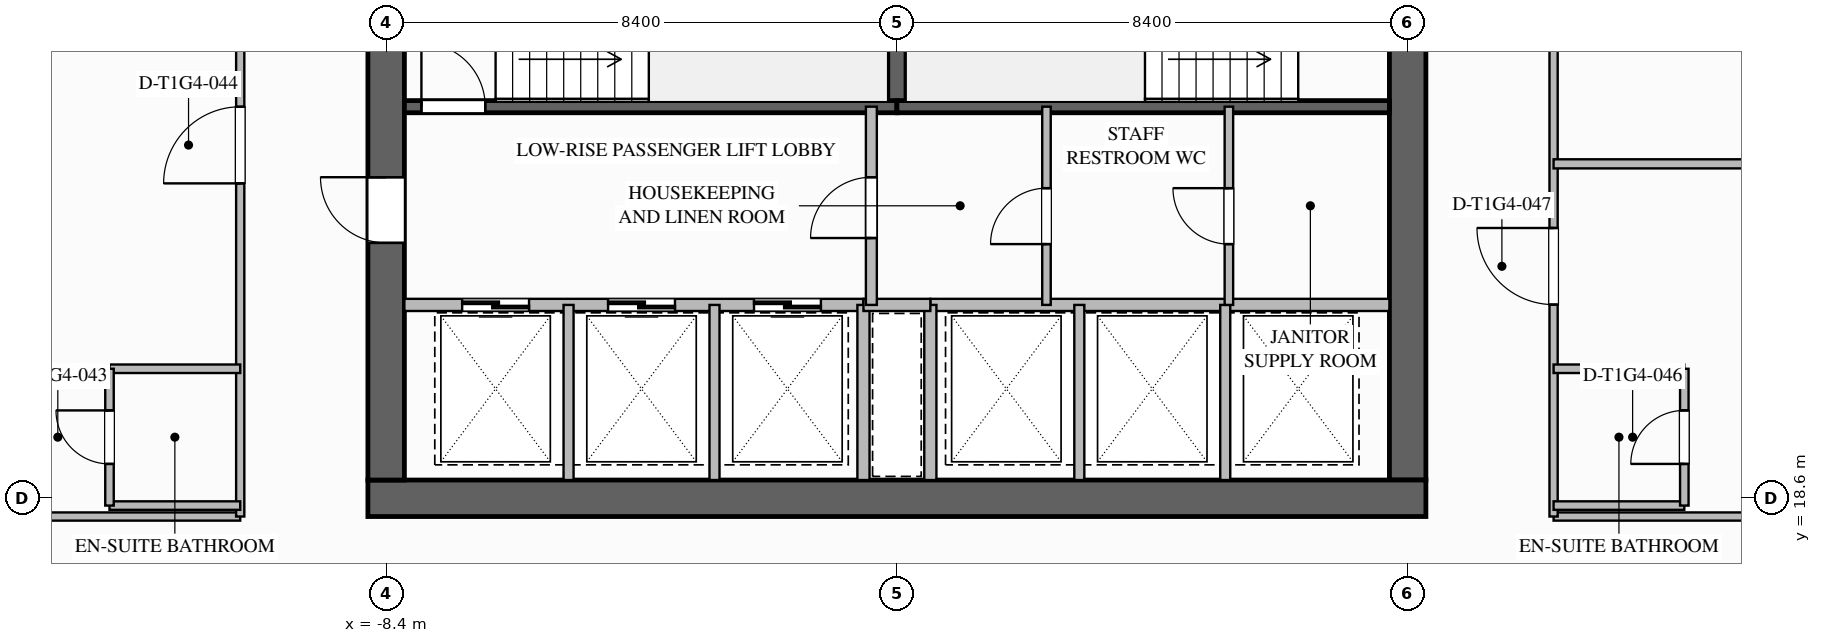
"""IFC4 building model, lengths in metres.
Left out: names, types, materials, properties, quantities, classifications, styles, units other than length and angle.
Written with IfcOpenShell. Run it as: python <this file> out.ifc"""

import sys

from ifc_helpers import new_model, si_unit, direction, frame, frame_2d, origin, place, context, subcontext, project, spatial, rectangle, extrude, element, fill, save


model = new_model("IFC4")
c1 = context("Model", 3, precision=1e-05, world=origin(), true_north=direction((0.0, 1.0)))
c2 = subcontext(c1, "Body", "Model", "MODEL_VIEW")
j1 = project(units=[si_unit("LENGTHUNIT", "METRE"), si_unit("PLANEANGLEUNIT", "RADIAN")], contexts=[c1])
p1 = place(None, origin())
s1 = spatial("IfcSite", under=j1, at=p1, CompositionType="ELEMENT")
p2 = place(p1, origin())
s2 = spatial("IfcBuilding", under=s1, at=p2, CompositionType="ELEMENT")
p3 = place(p2, frame((0.0, 0.0, 64.7)))
s3 = spatial("IfcBuildingStorey", under=s2, at=p3, CompositionType="ELEMENT", Elevation=64.7)
p4 = place(p3, frame((8.4, 35.1, 0.0), z_axis=(0.0, 0.0, 1.0), x_axis=(0.0, -1.0, 0.0)))
e1 = element("IfcWall", 1, at=p4, inside=s3, PredefinedType="SHEAR", context=c2, shape_type="SweptSolid", body=[
    extrude(rectangle(XDim=16.2, YDim=0.6, at=frame_2d((8.1, 0.0))), origin(), (0.0, 0.0, 1.0), 3.5),
])
p5 = place(p4, frame((3.08, 0.0, 0.0)))
e2 = element("IfcOpeningElement", 2, at=p5, cuts=e1, PredefinedType="OPENING", context=c2, shape_type="SweptSolid", body=[
    extrude(rectangle(XDim=1.12, YDim=2.1, at=frame_2d((0.56, 1.05))), frame((0.0, 0.31, 0.0), z_axis=(0.0, -1.0, 0.0), x_axis=(1.0, 0.0, 0.0)), (0.0, 0.0, 1.0), 0.62),
])
p6 = place(p3, frame((8.7, 18.6, 0.0), z_axis=(0.0, 0.0, 1.0), x_axis=(-1.0, 0.0, 0.0)))
e3 = element("IfcWall", 3, at=p6, inside=s3, PredefinedType="SHEAR", context=c2, shape_type="SweptSolid", body=[
    extrude(rectangle(XDim=17.4, YDim=0.6, at=frame_2d((8.7, 0.0))), origin(), (0.0, 0.0, 1.0), 3.5),
])
p7 = place(p3, frame((-8.4, 18.9, 0.0), z_axis=(0.0, 0.0, 1.0), x_axis=(0.0, 1.0, 0.0)))
e4 = element("IfcWall", 4, at=p7, inside=s3, PredefinedType="SHEAR", context=c2, shape_type="SweptSolid", body=[
    extrude(rectangle(XDim=16.2, YDim=0.6, at=frame_2d((8.1, 0.0))), origin(), (0.0, 0.0, 1.0), 3.5),
])
p8 = place(p7, frame((3.9, 0.0, 0.0)))
e5 = element("IfcOpeningElement", 5, at=p8, cuts=e4, PredefinedType="OPENING", context=c2, shape_type="SweptSolid", body=[
    extrude(rectangle(XDim=1.08, YDim=2.04, at=frame_2d((0.54, 1.02))), frame((0.0, 0.31, 0.0), z_axis=(0.0, -1.0, 0.0), x_axis=(1.0, 0.0, 0.0)), (0.0, 0.0, 1.0), 0.62),
])
p9 = place(p3, frame((0.0, 25.04, 0.0), z_axis=(0.0, 0.0, 1.0), x_axis=(0.0, 1.0, 0.0)))
e6 = element("IfcWall", 6, at=p9, inside=s3, PredefinedType="SOLIDWALL", context=c2, shape_type="SweptSolid", body=[
    extrude(rectangle(XDim=3.12, YDim=0.3, at=frame_2d((1.56, 0.0))), origin(), (0.0, 0.0, 1.0), 3.24),
])
p10 = place(p3, frame((-8.1, 25.04, 0.0), z_axis=(0.0, 0.0, 1.0), x_axis=(1.0, 0.0, 0.0)))
e7 = element("IfcWall", 7, at=p10, inside=s3, PredefinedType="SOLIDWALL", context=c2, shape_type="SweptSolid", body=[
    extrude(rectangle(XDim=8.1, YDim=0.2, at=frame_2d((4.05, 0.0))), origin(), (0.0, 0.0, 1.0), 3.24),
])
p11 = place(p10, frame((0.28, 0.0, 0.0)))
e8 = element("IfcOpeningElement", 8, at=p11, cuts=e7, PredefinedType="OPENING", context=c2, shape_type="SweptSolid", body=[
    extrude(rectangle(XDim=1.05, YDim=2.1, at=frame_2d((0.525, 1.05))), frame((0.0, 0.11, 0.0), z_axis=(0.0, -1.0, 0.0), x_axis=(1.0, 0.0, 0.0)), (0.0, 0.0, 1.0), 0.22),
])
p12 = place(p3, frame((0.0, 25.04, 0.0), z_axis=(0.0, 0.0, 1.0), x_axis=(1.0, 0.0, 0.0)))
e9 = element("IfcWall", 9, at=p12, inside=s3, PredefinedType="SOLIDWALL", context=c2, shape_type="SweptSolid", body=[
    extrude(rectangle(XDim=8.1, YDim=0.2, at=frame_2d((4.05, 0.0))), origin(), (0.0, 0.0, 1.0), 3.24),
])
p13 = place(p3, frame((-0.55, 21.78, 0.0), z_axis=(0.0, 0.0, 1.0), x_axis=(-1.0, 0.0, 0.0)))
e10 = element("IfcWall", 10, at=p13, inside=s3, PredefinedType="SOLIDWALL", context=c2, shape_type="SweptSolid", body=[
    extrude(rectangle(XDim=7.55, YDim=0.2, at=frame_2d((3.775, 0.0))), origin(), (0.0, 0.0, 1.0), 3.24),
])
p14 = place(p13, frame((5.5, 0.0, 0.0)))
e11 = element("IfcOpeningElement", 11, at=p14, cuts=e10, PredefinedType="OPENING", context=c2, shape_type="SweptSolid", body=[
    extrude(rectangle(XDim=1.1, YDim=2.2, at=frame_2d((0.55, 1.1))), frame((0.0, 0.11, 0.0), z_axis=(0.0, -1.0, 0.0), x_axis=(1.0, 0.0, 0.0)), (0.0, 0.0, 1.0), 0.22),
])
p15 = place(p13, frame((3.1, 0.0, 0.0)))
e12 = element("IfcOpeningElement", 12, at=p15, cuts=e10, PredefinedType="OPENING", context=c2, shape_type="SweptSolid", body=[
    extrude(rectangle(XDim=1.1, YDim=2.2, at=frame_2d((0.55, 1.1))), frame((0.0, 0.11, 0.0), z_axis=(0.0, -1.0, 0.0), x_axis=(1.0, 0.0, 0.0)), (0.0, 0.0, 1.0), 0.22),
])
p16 = place(p13, frame((0.7, 0.0, 0.0)))
e13 = element("IfcOpeningElement", 13, at=p16, cuts=e10, PredefinedType="OPENING", context=c2, shape_type="SweptSolid", body=[
    extrude(rectangle(XDim=1.1, YDim=2.2, at=frame_2d((0.55, 1.1))), frame((0.0, 0.11, 0.0), z_axis=(0.0, -1.0, 0.0), x_axis=(1.0, 0.0, 0.0)), (0.0, 0.0, 1.0), 0.22),
])
for number, where, z_axis, x_axis in (
    (14, (-5.4, 18.9, 0.0), (0.0, 0.0, 1.0), (0.0, 1.0, 0.0)),
    (15, (-3.0, 18.9, 0.0), (0.0, 0.0, 1.0), (0.0, 1.0, 0.0)),
):
    element("IfcWall", number, at=place(p3, frame(where, z_axis=z_axis, x_axis=x_axis)), inside=s3, PredefinedType="PARTITIONING", context=c2, shape_type="SweptSolid", body=[
        extrude(rectangle(XDim=2.88, YDim=0.165, at=frame_2d((1.44, 0.0))), origin(), (0.0, 0.0, 1.0), 3.24),
    ])
p17 = place(p3, frame((-0.55, 18.9, 0.0), z_axis=(0.0, 0.0, 1.0), x_axis=(0.0, 1.0, 0.0)))
e16 = element("IfcWall", 16, at=p17, inside=s3, PredefinedType="SOLIDWALL", context=c2, shape_type="SweptSolid", body=[
    extrude(rectangle(XDim=2.88, YDim=0.2, at=frame_2d((1.44, 0.0))), origin(), (0.0, 0.0, 1.0), 3.24),
])
p18 = place(p3, frame((8.1, 21.78, 0.0), z_axis=(0.0, 0.0, 1.0), x_axis=(-1.0, 0.0, 0.0)))
e17 = element("IfcWall", 17, at=p18, inside=s3, PredefinedType="SOLIDWALL", context=c2, shape_type="SweptSolid", body=[
    extrude(rectangle(XDim=7.55, YDim=0.2, at=frame_2d((3.775, 0.0))), origin(), (0.0, 0.0, 1.0), 3.24),
])
p19 = place(p3, frame((0.55, 18.9, 0.0), z_axis=(0.0, 0.0, 1.0), x_axis=(0.0, 1.0, 0.0)))
e18 = element("IfcWall", 18, at=p19, inside=s3, PredefinedType="SOLIDWALL", context=c2, shape_type="SweptSolid", body=[
    extrude(rectangle(XDim=2.88, YDim=0.2, at=frame_2d((1.44, 0.0))), origin(), (0.0, 0.0, 1.0), 3.24),
])
for number, where, z_axis, x_axis in (
    (19, (3.0, 18.9, 0.0), (0.0, 0.0, 1.0), (0.0, 1.0, 0.0)),
    (20, (5.4, 18.9, 0.0), (0.0, 0.0, 1.0), (0.0, 1.0, 0.0)),
):
    element("IfcWall", number, at=place(p3, frame(where, z_axis=z_axis, x_axis=x_axis)), inside=s3, PredefinedType="PARTITIONING", context=c2, shape_type="SweptSolid", body=[
        extrude(rectangle(XDim=2.88, YDim=0.165, at=frame_2d((1.44, 0.0))), origin(), (0.0, 0.0, 1.0), 3.24),
    ])
p20 = place(p3, frame((-0.55, 21.78, 0.0), z_axis=(0.0, 0.0, 1.0), x_axis=(1.0, 0.0, 0.0)))
e21 = element("IfcWall", 21, at=p20, inside=s3, PredefinedType="SOLIDWALL", context=c2, shape_type="SweptSolid", body=[
    extrude(rectangle(XDim=1.1, YDim=0.2, at=frame_2d((0.55, 0.0))), origin(), (0.0, 0.0, 1.0), 3.24),
])
p21 = place(p3, frame((-0.42, 21.78, 0.0), z_axis=(0.0, 0.0, 1.0), x_axis=(0.0, 1.0, 0.0)))
e22 = element("IfcWall", 22, at=p21, inside=s3, PredefinedType="SOLIDWALL", context=c2, shape_type="SweptSolid", body=[
    extrude(rectangle(XDim=3.26, YDim=0.18, at=frame_2d((1.63, 0.0))), origin(), (0.0, 0.0, 1.0), 3.24),
])
p22 = place(p21, frame((1.1, 0.0, 0.0)))
e23 = element("IfcOpeningElement", 23, at=p22, cuts=e22, PredefinedType="OPENING", context=c2, shape_type="SweptSolid", body=[
    extrude(rectangle(XDim=1.0, YDim=2.1, at=frame_2d((0.5, 1.05))), frame((0.0, 0.1, 0.0), z_axis=(0.0, -1.0, 0.0), x_axis=(1.0, 0.0, 0.0)), (0.0, 0.0, 1.0), 0.2),
])
p23 = place(p3, frame((2.46, 21.78, 0.0), z_axis=(0.0, 0.0, 1.0), x_axis=(0.0, 1.0, 0.0)))
e24 = element("IfcWall", 24, at=p23, inside=s3, PredefinedType="PLUMBINGWALL", context=c2, shape_type="SweptSolid", body=[
    extrude(rectangle(XDim=3.26, YDim=0.14, at=frame_2d((1.63, 0.0))), origin(), (0.0, 0.0, 1.0), 3.24),
])
p24 = place(p23, frame((1.0, 0.0, 0.0)))
e25 = element("IfcOpeningElement", 25, at=p24, cuts=e24, PredefinedType="OPENING", context=c2, shape_type="SweptSolid", body=[
    extrude(rectangle(XDim=0.92, YDim=2.1, at=frame_2d((0.46, 1.05))), frame((0.0, 0.08, 0.0), z_axis=(0.0, -1.0, 0.0), x_axis=(1.0, 0.0, 0.0)), (0.0, 0.0, 1.0), 0.16),
])
p25 = place(p3, frame((5.46, 21.78, 0.0), z_axis=(0.0, 0.0, 1.0), x_axis=(0.0, 1.0, 0.0)))
e26 = element("IfcWall", 26, at=p25, inside=s3, PredefinedType="PLUMBINGWALL", context=c2, shape_type="SweptSolid", body=[
    extrude(rectangle(XDim=3.26, YDim=0.14, at=frame_2d((1.63, 0.0))), origin(), (0.0, 0.0, 1.0), 3.24),
])
p26 = place(p25, frame((1.0, 0.0, 0.0)))
e27 = element("IfcOpeningElement", 27, at=p26, cuts=e26, PredefinedType="OPENING", context=c2, shape_type="SweptSolid", body=[
    extrude(rectangle(XDim=0.92, YDim=2.1, at=frame_2d((0.46, 1.05))), frame((0.0, 0.08, 0.0), z_axis=(0.0, -1.0, 0.0), x_axis=(1.0, 0.0, 0.0)), (0.0, 0.0, 1.0), 0.16),
])
for number, where, z_axis, x_axis in (
    (28, (-16.2, 18.3, 0.0), (0.0, 0.0, 1.0), (1.0, 0.0, 0.0)),
    (29, (10.8, 18.3, 0.0), (0.0, 0.0, 1.0), (1.0, 0.0, 0.0)),
):
    element("IfcWall", number, at=place(p3, frame(where, z_axis=z_axis, x_axis=x_axis)), inside=s3, PredefinedType="PARTITIONING", context=c2, shape_type="SweptSolid", body=[
        extrude(rectangle(XDim=5.4, YDim=0.135, at=frame_2d((2.7, 0.0))), origin(), (0.0, 0.0, 1.0), 3.24),
    ])
p27 = place(p3, frame((-10.8, 18.3, 0.0), z_axis=(0.0, 0.0, 1.0), x_axis=(0.0, 1.0, 0.0)))
e30 = element("IfcWall", 30, at=p27, inside=s3, PredefinedType="PARTITIONING", context=c2, shape_type="SweptSolid", body=[
    extrude(rectangle(XDim=17.4, YDim=0.135, at=frame_2d((8.7, 0.0))), origin(), (0.0, 0.0, 1.0), 3.24),
])
p28 = place(p27, frame((5.479, 0.0, 0.0)))
e31 = element("IfcOpeningElement", 31, at=p28, cuts=e30, PredefinedType="OPENING", context=c2, shape_type="SweptSolid", body=[
    extrude(rectangle(XDim=1.26, YDim=2.2, at=frame_2d((0.63, 1.1))), frame((0.0, 0.077, 0.0), z_axis=(0.0, -1.0, 0.0), x_axis=(1.0, 0.0, 0.0)), (0.0, 0.0, 1.0), 0.155),
])
p29 = place(p27, frame((13.084, 0.0, 0.0)))
e32 = element("IfcOpeningElement", 32, at=p29, cuts=e30, PredefinedType="OPENING", context=c2, shape_type="SweptSolid", body=[
    extrude(rectangle(XDim=1.02, YDim=2.15, at=frame_2d((0.51, 1.075))), frame((0.0, 0.077, 0.0), z_axis=(0.0, -1.0, 0.0), x_axis=(1.0, 0.0, 0.0)), (0.0, 0.0, 1.0), 0.155),
])
p30 = place(p3, frame((10.8, 18.3, 0.0), z_axis=(0.0, 0.0, 1.0), x_axis=(0.0, 1.0, 0.0)))
e33 = element("IfcWall", 33, at=p30, inside=s3, PredefinedType="PARTITIONING", context=c2, shape_type="SweptSolid", body=[
    extrude(rectangle(XDim=17.4, YDim=0.135, at=frame_2d((8.7, 0.0))), origin(), (0.0, 0.0, 1.0), 3.24),
])
p31 = place(p30, frame((3.485, 0.0, 0.0)))
e34 = element("IfcOpeningElement", 34, at=p31, cuts=e33, PredefinedType="OPENING", context=c2, shape_type="SweptSolid", body=[
    extrude(rectangle(XDim=1.26, YDim=2.2, at=frame_2d((0.63, 1.1))), frame((0.0, 0.077, 0.0), z_axis=(0.0, -1.0, 0.0), x_axis=(1.0, 0.0, 0.0)), (0.0, 0.0, 1.0), 0.155),
])
p32 = place(p30, frame((8.19, 0.0, 0.0)))
e35 = element("IfcOpeningElement", 35, at=p32, cuts=e33, PredefinedType="OPENING", context=c2, shape_type="SweptSolid", body=[
    extrude(rectangle(XDim=1.02, YDim=2.15, at=frame_2d((0.51, 1.075))), frame((0.0, 0.077, 0.0), z_axis=(0.0, -1.0, 0.0), x_axis=(1.0, 0.0, 0.0)), (0.0, 0.0, 1.0), 0.155),
])
p33 = place(p30, frame((15.085, 0.0, 0.0)))
e36 = element("IfcOpeningElement", 36, at=p33, cuts=e33, PredefinedType="OPENING", context=c2, shape_type="SweptSolid", body=[
    extrude(rectangle(XDim=1.26, YDim=2.2, at=frame_2d((0.63, 1.1))), frame((0.0, 0.077, 0.0), z_axis=(0.0, -1.0, 0.0), x_axis=(1.0, 0.0, 0.0)), (0.0, 0.0, 1.0), 0.155),
])
p34 = place(p3, frame((-10.8, 18.48, 0.0), z_axis=(0.0, 0.0, 1.0), x_axis=(-1.0, 0.0, 0.0)))
e37 = element("IfcWall", 37, at=p34, inside=s3, PredefinedType="PLUMBINGWALL", context=c2, shape_type="SweptSolid", body=[
    extrude(rectangle(XDim=2.15, YDim=0.14, at=frame_2d((1.075, 0.0))), origin(), (0.0, 0.0, 1.0), 2.617),
])
p35 = place(p3, frame((-10.8, 20.73, 0.0), z_axis=(0.0, 0.0, 1.0), x_axis=(-1.0, 0.0, 0.0)))
e38 = element("IfcWall", 38, at=p35, inside=s3, PredefinedType="PLUMBINGWALL", context=c2, shape_type="SweptSolid", body=[
    extrude(rectangle(XDim=2.15, YDim=0.14, at=frame_2d((1.075, 0.0))), origin(), (0.0, 0.0, 1.0), 3.24),
])
p36 = place(p3, frame((-12.95, 18.48, 0.0), z_axis=(0.0, 0.0, 1.0), x_axis=(0.0, 1.0, 0.0)))
e39 = element("IfcWall", 39, at=p36, inside=s3, PredefinedType="PLUMBINGWALL", context=c2, shape_type="SweptSolid", body=[
    extrude(rectangle(XDim=2.25, YDim=0.14, at=frame_2d((1.125, 0.0))), origin(), (0.0, 0.0, 1.0), 3.24),
])
p37 = place(p36, frame((0.685, 0.0, 0.0)))
e40 = element("IfcOpeningElement", 40, at=p37, cuts=e39, PredefinedType="OPENING", context=c2, shape_type="SweptSolid", body=[
    extrude(rectangle(XDim=0.88, YDim=2.1, at=frame_2d((0.44, 1.05))), frame((0.0, 0.08, 0.0), z_axis=(0.0, -1.0, 0.0), x_axis=(1.0, 0.0, 0.0)), (0.0, 0.0, 1.0), 0.16),
])
p38 = place(p3, frame((10.8, 18.48, 0.0), z_axis=(0.0, 0.0, 1.0), x_axis=(1.0, 0.0, 0.0)))
e41 = element("IfcWall", 41, at=p38, inside=s3, PredefinedType="PLUMBINGWALL", context=c2, shape_type="SweptSolid", body=[
    extrude(rectangle(XDim=2.15, YDim=0.14, at=frame_2d((1.075, 0.0))), origin(), (0.0, 0.0, 1.0), 2.617),
])
p39 = place(p3, frame((10.8, 20.73, 0.0), z_axis=(0.0, 0.0, 1.0), x_axis=(1.0, 0.0, 0.0)))
e42 = element("IfcWall", 42, at=p39, inside=s3, PredefinedType="PLUMBINGWALL", context=c2, shape_type="SweptSolid", body=[
    extrude(rectangle(XDim=2.15, YDim=0.14, at=frame_2d((1.075, 0.0))), origin(), (0.0, 0.0, 1.0), 3.24),
])
p40 = place(p3, frame((12.95, 18.48, 0.0), z_axis=(0.0, 0.0, 1.0), x_axis=(0.0, 1.0, 0.0)))
e43 = element("IfcWall", 43, at=p40, inside=s3, PredefinedType="PLUMBINGWALL", context=c2, shape_type="SweptSolid", body=[
    extrude(rectangle(XDim=2.25, YDim=0.14, at=frame_2d((1.125, 0.0))), origin(), (0.0, 0.0, 1.0), 3.24),
])
p41 = place(p40, frame((0.685, 0.0, 0.0)))
e44 = element("IfcOpeningElement", 44, at=p41, cuts=e43, PredefinedType="OPENING", context=c2, shape_type="SweptSolid", body=[
    extrude(rectangle(XDim=0.88, YDim=2.1, at=frame_2d((0.44, 1.05))), frame((0.0, 0.08, 0.0), z_axis=(0.0, -1.0, 0.0), x_axis=(1.0, 0.0, 0.0)), (0.0, 0.0, 1.0), 0.16),
])
p42 = place(p3, frame((10.8, 24.1, 0.0), z_axis=(0.0, 0.0, 1.0), x_axis=(1.0, 0.0, 0.0)))
e45 = element("IfcWall", 45, at=p42, inside=s3, PredefinedType="PARTITIONING", context=c2, shape_type="SweptSolid", body=[
    extrude(rectangle(XDim=15.4, YDim=0.15, at=frame_2d((7.7, 0.0))), origin(), (0.0, 0.0, 1.0), 3.24),
])
p43 = place(p11, origin())
e46 = element("IfcDoor", 46, at=p43, inside=s3, OperationType="SINGLE_SWING_LEFT", PredefinedType="DOOR", context=c2, shape_type="SweptSolid", body=[
    extrude(rectangle(XDim=1.05, YDim=2.1, at=frame_2d((0.525, 1.05))), frame((0.0, 0.025, 0.0), z_axis=(0.0, -1.0, 0.0), x_axis=(1.0, 0.0, 0.0)), (0.0, 0.0, 1.0), 0.05),
])
fill(e8, e46)
p44 = place(p14, origin())
e47 = element("IfcDoor", 47, at=p44, inside=s3, OperationType="SLIDING_TO_LEFT", PredefinedType="DOOR", context=c2, shape_type="SweptSolid", body=[
    extrude(rectangle(XDim=1.1, YDim=2.2, at=frame_2d((0.55, 1.1))), frame((0.0, 0.025, 0.0), z_axis=(0.0, -1.0, 0.0), x_axis=(1.0, 0.0, 0.0)), (0.0, 0.0, 1.0), 0.05),
])
fill(e11, e47)
p45 = place(p15, origin())
e48 = element("IfcDoor", 48, at=p45, inside=s3, OperationType="SLIDING_TO_LEFT", PredefinedType="DOOR", context=c2, shape_type="SweptSolid", body=[
    extrude(rectangle(XDim=1.1, YDim=2.2, at=frame_2d((0.55, 1.1))), frame((0.0, 0.025, 0.0), z_axis=(0.0, -1.0, 0.0), x_axis=(1.0, 0.0, 0.0)), (0.0, 0.0, 1.0), 0.05),
])
fill(e12, e48)
p46 = place(p16, origin())
e49 = element("IfcDoor", 49, at=p46, inside=s3, OperationType="SLIDING_TO_LEFT", PredefinedType="DOOR", context=c2, shape_type="SweptSolid", body=[
    extrude(rectangle(XDim=1.1, YDim=2.2, at=frame_2d((0.55, 1.1))), frame((0.0, 0.025, 0.0), z_axis=(0.0, -1.0, 0.0), x_axis=(1.0, 0.0, 0.0)), (0.0, 0.0, 1.0), 0.05),
])
fill(e13, e49)
p47 = place(p22, origin())
e50 = element("IfcDoor", 50, at=p47, inside=s3, OperationType="SINGLE_SWING_LEFT", PredefinedType="DOOR", context=c2, shape_type="SweptSolid", body=[
    extrude(rectangle(XDim=1.0, YDim=2.1, at=frame_2d((0.5, 1.05))), frame((0.0, 0.025, 0.0), z_axis=(0.0, -1.0, 0.0), x_axis=(1.0, 0.0, 0.0)), (0.0, 0.0, 1.0), 0.05),
])
fill(e23, e50)
p48 = place(p8, origin())
e51 = element("IfcDoor", 51, at=p48, inside=s3, OperationType="SINGLE_SWING_RIGHT", PredefinedType="DOOR", context=c2, shape_type="SweptSolid", body=[
    extrude(rectangle(XDim=1.08, YDim=2.04, at=frame_2d((0.54, 1.02))), frame((0.0, 0.025, 0.0), z_axis=(0.0, -1.0, 0.0), x_axis=(1.0, 0.0, 0.0)), (0.0, 0.0, 1.0), 0.05),
])
fill(e5, e51)
p49 = place(p24, origin())
e52 = element("IfcDoor", 52, at=p49, inside=s3, OperationType="SINGLE_SWING_LEFT", PredefinedType="DOOR", context=c2, shape_type="SweptSolid", body=[
    extrude(rectangle(XDim=0.92, YDim=2.1, at=frame_2d((0.46, 1.05))), frame((0.0, 0.025, 0.0), z_axis=(0.0, -1.0, 0.0), x_axis=(1.0, 0.0, 0.0)), (0.0, 0.0, 1.0), 0.05),
])
fill(e25, e52)
p50 = place(p26, origin())
e53 = element("IfcDoor", 53, at=p50, inside=s3, OperationType="SINGLE_SWING_RIGHT", PredefinedType="DOOR", context=c2, shape_type="SweptSolid", body=[
    extrude(rectangle(XDim=0.92, YDim=2.1, at=frame_2d((0.46, 1.05))), frame((0.0, 0.025, 0.0), z_axis=(0.0, -1.0, 0.0), x_axis=(1.0, 0.0, 0.0)), (0.0, 0.0, 1.0), 0.05),
])
fill(e27, e53)
p51 = place(p37, origin())
e54 = element("IfcDoor", 54, at=p51, inside=s3, OperationType="SINGLE_SWING_RIGHT", PredefinedType="DOOR", context=c2, shape_type="SweptSolid", body=[
    extrude(rectangle(XDim=0.88, YDim=2.1, at=frame_2d((0.44, 1.05))), frame((0.0, 0.025, 0.0), z_axis=(0.0, -1.0, 0.0), x_axis=(1.0, 0.0, 0.0)), (0.0, 0.0, 1.0), 0.05),
])
fill(e40, e54)
p52 = place(p28, origin())
e55 = element("IfcDoor", 55, at=p52, inside=s3, OperationType="SINGLE_SWING_LEFT", PredefinedType="DOOR", context=c2, shape_type="SweptSolid", body=[
    extrude(rectangle(XDim=1.26, YDim=2.2, at=frame_2d((0.63, 1.1))), frame((0.0, 0.025, 0.0), z_axis=(0.0, -1.0, 0.0), x_axis=(1.0, 0.0, 0.0)), (0.0, 0.0, 1.0), 0.05),
])
fill(e31, e55)
p53 = place(p41, origin())
e56 = element("IfcDoor", 56, at=p53, inside=s3, OperationType="SINGLE_SWING_LEFT", PredefinedType="DOOR", context=c2, shape_type="SweptSolid", body=[
    extrude(rectangle(XDim=0.88, YDim=2.1, at=frame_2d((0.44, 1.05))), frame((0.0, 0.025, 0.0), z_axis=(0.0, -1.0, 0.0), x_axis=(1.0, 0.0, 0.0)), (0.0, 0.0, 1.0), 0.05),
])
fill(e44, e56)
p54 = place(p31, origin())
e57 = element("IfcDoor", 57, at=p54, inside=s3, OperationType="SINGLE_SWING_RIGHT", PredefinedType="DOOR", context=c2, shape_type="SweptSolid", body=[
    extrude(rectangle(XDim=1.26, YDim=2.2, at=frame_2d((0.63, 1.1))), frame((0.0, 0.025, 0.0), z_axis=(0.0, -1.0, 0.0), x_axis=(1.0, 0.0, 0.0)), (0.0, 0.0, 1.0), 0.05),
])
fill(e34, e57)
save(model, sys.argv[1])
